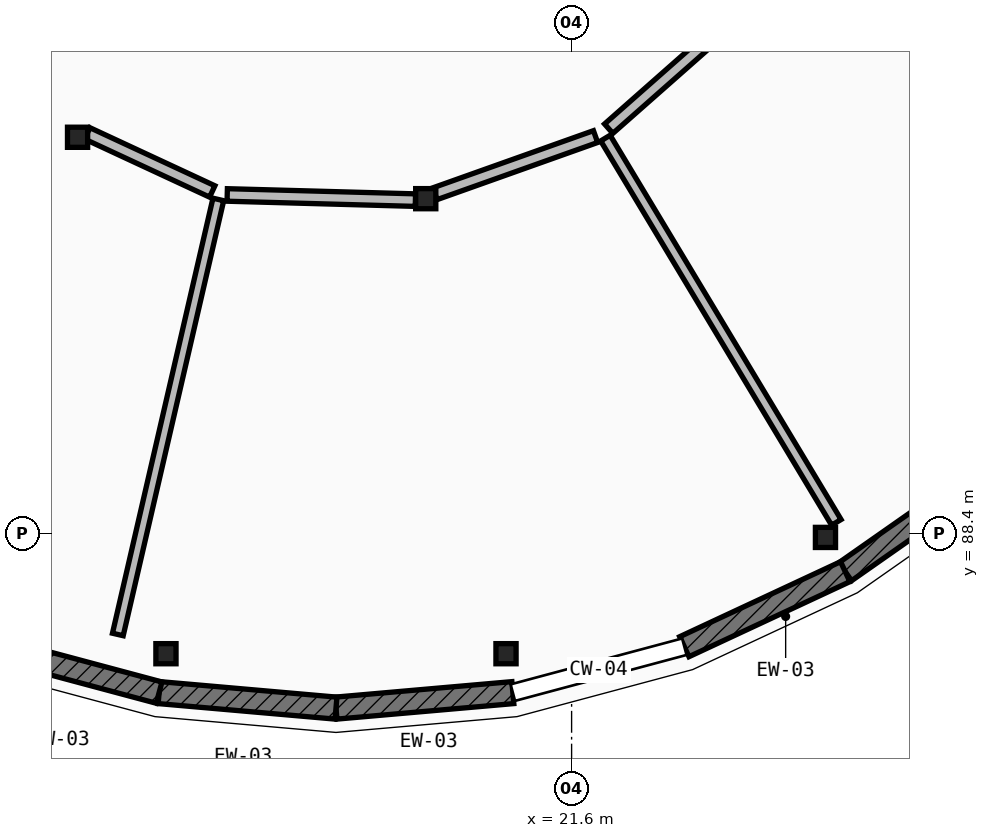
"""IFC4 building model, lengths in metres.
Left out: names, types, materials, properties, quantities, classifications, styles, units other than length and angle.
Written with IfcOpenShell. Run it as: python <this file> out.ifc"""

import sys

from ifc_helpers import new_model, si_unit, direction, frame, frame_2d, origin, origin_2d, place, context, subcontext, project, spatial, rectangle, extrude, element, fill, save


model = new_model("IFC4")
c1 = context("Model", 3, precision=1e-05, world=origin(), true_north=direction((0.0, 1.0)))
c2 = subcontext(c1, "Body", "Model", "MODEL_VIEW")
j1 = project(units=[si_unit("LENGTHUNIT", "METRE"), si_unit("PLANEANGLEUNIT", "RADIAN")], contexts=[c1])
p1 = place(None, origin())
s1 = spatial("IfcSite", under=j1, at=p1, CompositionType="ELEMENT")
p2 = place(p1, origin())
s2 = spatial("IfcBuilding", under=s1, at=p2, CompositionType="ELEMENT")
p3 = place(p2, frame((0.0, 0.0, 17.15)))
s3 = spatial("IfcBuildingStorey", under=s2, at=p3, CompositionType="ELEMENT", Elevation=17.15)
for number, where, z_axis, x_axis in (
    (1, (16.263, 86.816, 0.0), (0.0, 0.0, 1.0), (1.0, 0.0, 0.0)),
    (2, (20.737, 86.816, 0.0), (0.0, 0.0, 1.0), (1.0, 0.0, 0.0)),
    (3, (24.94, 88.346, 0.0), (0.0, 0.0, 1.0), (1.0, 0.0, 0.0)),
    (4, (15.1, 93.611, 0.0), (0.0, 0.0, 1.0), (1.0, 0.0, 0.0)),
    (5, (19.681, 92.803, 0.0), (0.0, 0.0, 1.0), (1.0, 0.0, 0.0)),
):
    element("IfcColumn", number, at=place(p3, frame(where, z_axis=z_axis, x_axis=x_axis)), inside=s3, PredefinedType="COLUMN", context=c2, shape_type="SweptSolid", body=[
        extrude(rectangle(XDim=0.265, YDim=0.265, at=origin_2d()), origin(), (0.0, 0.0, 1.0), 4.2),
    ])
p4 = place(p3, frame((27.113, 89.235, 0.0), z_axis=(0.0, 0.0, 1.0), x_axis=(-0.819045278347, -0.573728883722, 0.0)))
e6 = element("IfcWall", 6, at=p4, inside=s3, PredefinedType="ELEMENTEDWALL", context=c2, shape_type="SweptSolid", body=[
    extrude(rectangle(XDim=2.336, YDim=0.29, at=frame_2d((1.168, 0.0))), origin(), (0.0, 0.0, 1.0), 3.369),
])
p5 = place(p4, frame((0.543, 0.0, 0.85)))
e7 = element("IfcOpeningElement", 7, at=p5, cuts=e6, PredefinedType="OPENING", context=c2, shape_type="SweptSolid", body=[
    extrude(rectangle(XDim=1.25, YDim=1.8, at=frame_2d((0.625, 0.9))), frame((0.0, 0.155, 0.0), z_axis=(0.0, -1.0, 0.0), x_axis=(1.0, 0.0, 0.0)), (0.0, 0.0, 1.0), 0.31),
])
p6 = place(p3, frame((25.2, 87.895, 0.0), z_axis=(0.0, 0.0, 1.0), x_axis=(-0.906321946979, -0.422587894318, 0.0)))
e8 = element("IfcWall", 8, at=p6, inside=s3, PredefinedType="ELEMENTEDWALL", context=c2, shape_type="SweptSolid", body=[
    extrude(rectangle(XDim=2.336, YDim=0.29, at=frame_2d((1.168, 0.0))), origin(), (0.0, 0.0, 1.0), 3.369),
])
p7 = place(p6, frame((0.543, 0.0, 0.85)))
e9 = element("IfcOpeningElement", 9, at=p7, cuts=e8, PredefinedType="OPENING", context=c2, shape_type="SweptSolid", body=[
    extrude(rectangle(XDim=1.25, YDim=2.1, at=frame_2d((0.625, 1.05))), frame((0.0, 0.155, 0.0), z_axis=(0.0, -1.0, 0.0), x_axis=(1.0, 0.0, 0.0)), (0.0, 0.0, 1.0), 0.31),
])
p8 = place(p3, frame((20.827, 86.304, 0.0), z_axis=(0.0, 0.0, 1.0), x_axis=(-0.996184295282, -0.087274565792, 0.0)))
e10 = element("IfcWall", 10, at=p8, inside=s3, PredefinedType="ELEMENTEDWALL", context=c2, shape_type="SweptSolid", body=[
    extrude(rectangle(XDim=2.336, YDim=0.29, at=frame_2d((1.168, 0.0))), origin(), (0.0, 0.0, 1.0), 3.369),
])
p9 = place(p8, frame((0.528, 0.0, 0.85)))
e11 = element("IfcOpeningElement", 11, at=p9, cuts=e10, PredefinedType="OPENING", context=c2, shape_type="SweptSolid", body=[
    extrude(rectangle(XDim=1.28, YDim=1.65, at=frame_2d((0.64, 0.825))), frame((0.0, 0.155, 0.0), z_axis=(0.0, -1.0, 0.0), x_axis=(1.0, 0.0, 0.0)), (0.0, 0.0, 1.0), 0.31),
])
p10 = place(p3, frame((18.5, 86.1, 0.0), z_axis=(0.0, 0.0, 1.0), x_axis=(-0.996184295282, 0.087274565792, 0.0)))
e12 = element("IfcWall", 12, at=p10, inside=s3, PredefinedType="ELEMENTEDWALL", context=c2, shape_type="SweptSolid", body=[
    extrude(rectangle(XDim=2.336, YDim=0.29, at=frame_2d((1.168, 0.0))), origin(), (0.0, 0.0, 1.0), 3.369),
])
p11 = place(p10, frame((0.518, 0.0, 0.85)))
e13 = element("IfcOpeningElement", 13, at=p11, cuts=e12, PredefinedType="OPENING", context=c2, shape_type="SweptSolid", body=[
    extrude(rectangle(XDim=1.3, YDim=1.4, at=frame_2d((0.65, 0.7))), frame((0.0, 0.155, 0.0), z_axis=(0.0, -1.0, 0.0), x_axis=(1.0, 0.0, 0.0)), (0.0, 0.0, 1.0), 0.31),
])
p12 = place(p3, frame((16.173, 86.304, 0.0), z_axis=(0.0, 0.0, 1.0), x_axis=(-0.965981166673, 0.258612423585, 0.0)))
e14 = element("IfcWall", 14, at=p12, inside=s3, PredefinedType="ELEMENTEDWALL", context=c2, shape_type="SweptSolid", body=[
    extrude(rectangle(XDim=2.335, YDim=0.29, at=frame_2d((1.168, 0.0))), origin(), (0.0, 0.0, 1.0), 3.369),
])
p13 = place(p12, frame((0.518, 0.0, 0.85)))
e15 = element("IfcOpeningElement", 15, at=p13, cuts=e14, PredefinedType="OPENING", context=c2, shape_type="SweptSolid", body=[
    extrude(rectangle(XDim=1.3, YDim=1.7, at=frame_2d((0.65, 0.85))), frame((0.0, 0.155, 0.0), z_axis=(0.0, -1.0, 0.0), x_axis=(1.0, 0.0, 0.0)), (0.0, 0.0, 1.0), 0.31),
])
p14 = place(p3, frame((16.952, 92.793, 0.0), z_axis=(0.0, 0.0, 1.0), x_axis=(-0.225041614944, -0.97434915279, 0.0)))
e16 = element("IfcWall", 16, at=p14, inside=s3, PredefinedType="PARTITIONING", context=c2, shape_type="SweptSolid", body=[
    extrude(rectangle(XDim=5.875, YDim=0.145, at=frame_2d((2.937, 0.0))), origin(), (0.0, 0.0, 1.0), 3.344),
])
p15 = place(p3, frame((22.045, 93.6, 0.0), z_axis=(0.0, 0.0, 1.0), x_axis=(0.515043444679, -0.857164074197, 0.0)))
e17 = element("IfcWall", 17, at=p15, inside=s3, PredefinedType="PARTITIONING", context=c2, shape_type="SweptSolid", body=[
    extrude(rectangle(XDim=5.899, YDim=0.145, at=frame_2d((2.949, 0.0))), origin(), (0.0, 0.0, 1.0), 3.344),
])
p16 = place(p3, frame((15.228, 93.662, 0.0), z_axis=(0.0, 0.0, 1.0), x_axis=(0.906828861557, -0.421499010495, 0.0)))
e18 = element("IfcWall", 18, at=p16, inside=s3, PredefinedType="PARTITIONING", context=c2, shape_type="SweptSolid", body=[
    extrude(rectangle(XDim=1.813, YDim=0.165, at=frame_2d((0.906, 0.0))), origin(), (0.0, 0.0, 1.0), 3.344),
])
p17 = place(p3, frame((17.069, 92.852, 0.0), z_axis=(0.0, 0.0, 1.0), x_axis=(0.999621757445, -0.027501673437, 0.0)))
e19 = element("IfcWall", 19, at=p17, inside=s3, PredefinedType="PARTITIONING", context=c2, shape_type="SweptSolid", body=[
    extrude(rectangle(XDim=2.477, YDim=0.165, at=frame_2d((1.238, 0.0))), origin(), (0.0, 0.0, 1.0), 3.344),
])
p18 = place(p17, frame((0.679, 0.0, 0.0)))
e20 = element("IfcOpeningElement", 20, at=p18, cuts=e19, PredefinedType="OPENING", context=c2, shape_type="SweptSolid", body=[
    extrude(rectangle(XDim=1.12, YDim=2.16, at=frame_2d((0.56, 1.08))), frame((0.0, 0.093, 0.0), z_axis=(0.0, -1.0, 0.0), x_axis=(1.0, 0.0, 0.0)), (0.0, 0.0, 1.0), 0.185),
])
p19 = place(p3, frame((19.802, 92.868, 0.0), z_axis=(0.0, 0.0, 1.0), x_axis=(0.942088643155, 0.335363964132, 0.0)))
e21 = element("IfcWall", 21, at=p19, inside=s3, PredefinedType="PARTITIONING", context=c2, shape_type="SweptSolid", body=[
    extrude(rectangle(XDim=2.243, YDim=0.165, at=frame_2d((1.122, 0.0))), origin(), (0.0, 0.0, 1.0), 3.344),
])
p20 = place(p3, frame((22.088, 93.724, 0.0), z_axis=(0.0, 0.0, 1.0), x_axis=(0.750064751016, 0.66136439977, 0.0)))
e22 = element("IfcWall", 22, at=p20, inside=s3, PredefinedType="PARTITIONING", context=c2, shape_type="SweptSolid", body=[
    extrude(rectangle(XDim=2.009, YDim=0.165, at=frame_2d((1.005, 0.0))), origin(), (0.0, 0.0, 1.0), 3.344),
])
p21 = place(p20, frame((0.424, 0.0, 0.0)))
e23 = element("IfcOpeningElement", 23, at=p21, cuts=e22, PredefinedType="OPENING", context=c2, shape_type="SweptSolid", body=[
    extrude(rectangle(XDim=1.16, YDim=2.18, at=frame_2d((0.58, 1.09))), frame((0.0, 0.093, 0.0), z_axis=(0.0, -1.0, 0.0), x_axis=(1.0, 0.0, 0.0)), (0.0, 0.0, 1.0), 0.185),
])
p22 = place(p5, origin())
e24 = element("IfcWindow", 24, at=p22, inside=s3, PartitioningType="SINGLE_PANEL", PredefinedType="WINDOW", context=c2, shape_type="SweptSolid", body=[
    extrude(rectangle(XDim=1.25, YDim=1.8, at=frame_2d((0.625, 0.9))), frame((0.0, 0.03, 0.0), z_axis=(0.0, -1.0, 0.0), x_axis=(1.0, 0.0, 0.0)), (0.0, 0.0, 1.0), 0.06),
])
fill(e7, e24)
p23 = place(p7, origin())
e25 = element("IfcWindow", 25, at=p23, inside=s3, PartitioningType="SINGLE_PANEL", PredefinedType="WINDOW", context=c2, shape_type="SweptSolid", body=[
    extrude(rectangle(XDim=1.25, YDim=2.1, at=frame_2d((0.625, 1.05))), frame((0.0, 0.03, 0.0), z_axis=(0.0, -1.0, 0.0), x_axis=(1.0, 0.0, 0.0)), (0.0, 0.0, 1.0), 0.06),
])
fill(e9, e25)
p24 = place(p9, origin())
e26 = element("IfcWindow", 26, at=p24, inside=s3, PartitioningType="SINGLE_PANEL", PredefinedType="WINDOW", context=c2, shape_type="SweptSolid", body=[
    extrude(rectangle(XDim=1.28, YDim=1.65, at=frame_2d((0.64, 0.825))), frame((0.0, 0.03, 0.0), z_axis=(0.0, -1.0, 0.0), x_axis=(1.0, 0.0, 0.0)), (0.0, 0.0, 1.0), 0.06),
])
fill(e11, e26)
p25 = place(p11, origin())
e27 = element("IfcWindow", 27, at=p25, inside=s3, PartitioningType="SINGLE_PANEL", PredefinedType="WINDOW", context=c2, shape_type="SweptSolid", body=[
    extrude(rectangle(XDim=1.3, YDim=1.4, at=frame_2d((0.65, 0.7))), frame((0.0, 0.03, 0.0), z_axis=(0.0, -1.0, 0.0), x_axis=(1.0, 0.0, 0.0)), (0.0, 0.0, 1.0), 0.06),
])
fill(e13, e27)
p26 = place(p13, origin())
e28 = element("IfcWindow", 28, at=p26, inside=s3, PartitioningType="SINGLE_PANEL", PredefinedType="WINDOW", context=c2, shape_type="SweptSolid", body=[
    extrude(rectangle(XDim=1.3, YDim=1.7, at=frame_2d((0.65, 0.85))), frame((0.0, 0.03, 0.0), z_axis=(0.0, -1.0, 0.0), x_axis=(1.0, 0.0, 0.0)), (0.0, 0.0, 1.0), 0.06),
])
fill(e15, e28)
p27 = place(p18, origin())
e29 = element("IfcDoor", 29, at=p27, inside=s3, OperationType="SINGLE_SWING_RIGHT", PredefinedType="DOOR", context=c2, shape_type="SweptSolid", body=[
    extrude(rectangle(XDim=1.12, YDim=2.16, at=frame_2d((0.56, 1.08))), frame((0.0, 0.025, 0.0), z_axis=(0.0, -1.0, 0.0), x_axis=(1.0, 0.0, 0.0)), (0.0, 0.0, 1.0), 0.05),
])
fill(e20, e29)
p28 = place(p21, origin())
e30 = element("IfcDoor", 30, at=p28, inside=s3, OperationType="SINGLE_SWING_LEFT", PredefinedType="DOOR", context=c2, shape_type="SweptSolid", body=[
    extrude(rectangle(XDim=1.16, YDim=2.18, at=frame_2d((0.58, 1.09))), frame((0.0, 0.025, 0.0), z_axis=(0.0, -1.0, 0.0), x_axis=(1.0, 0.0, 0.0)), (0.0, 0.0, 1.0), 0.05),
])
fill(e23, e30)
save(model, sys.argv[1])
